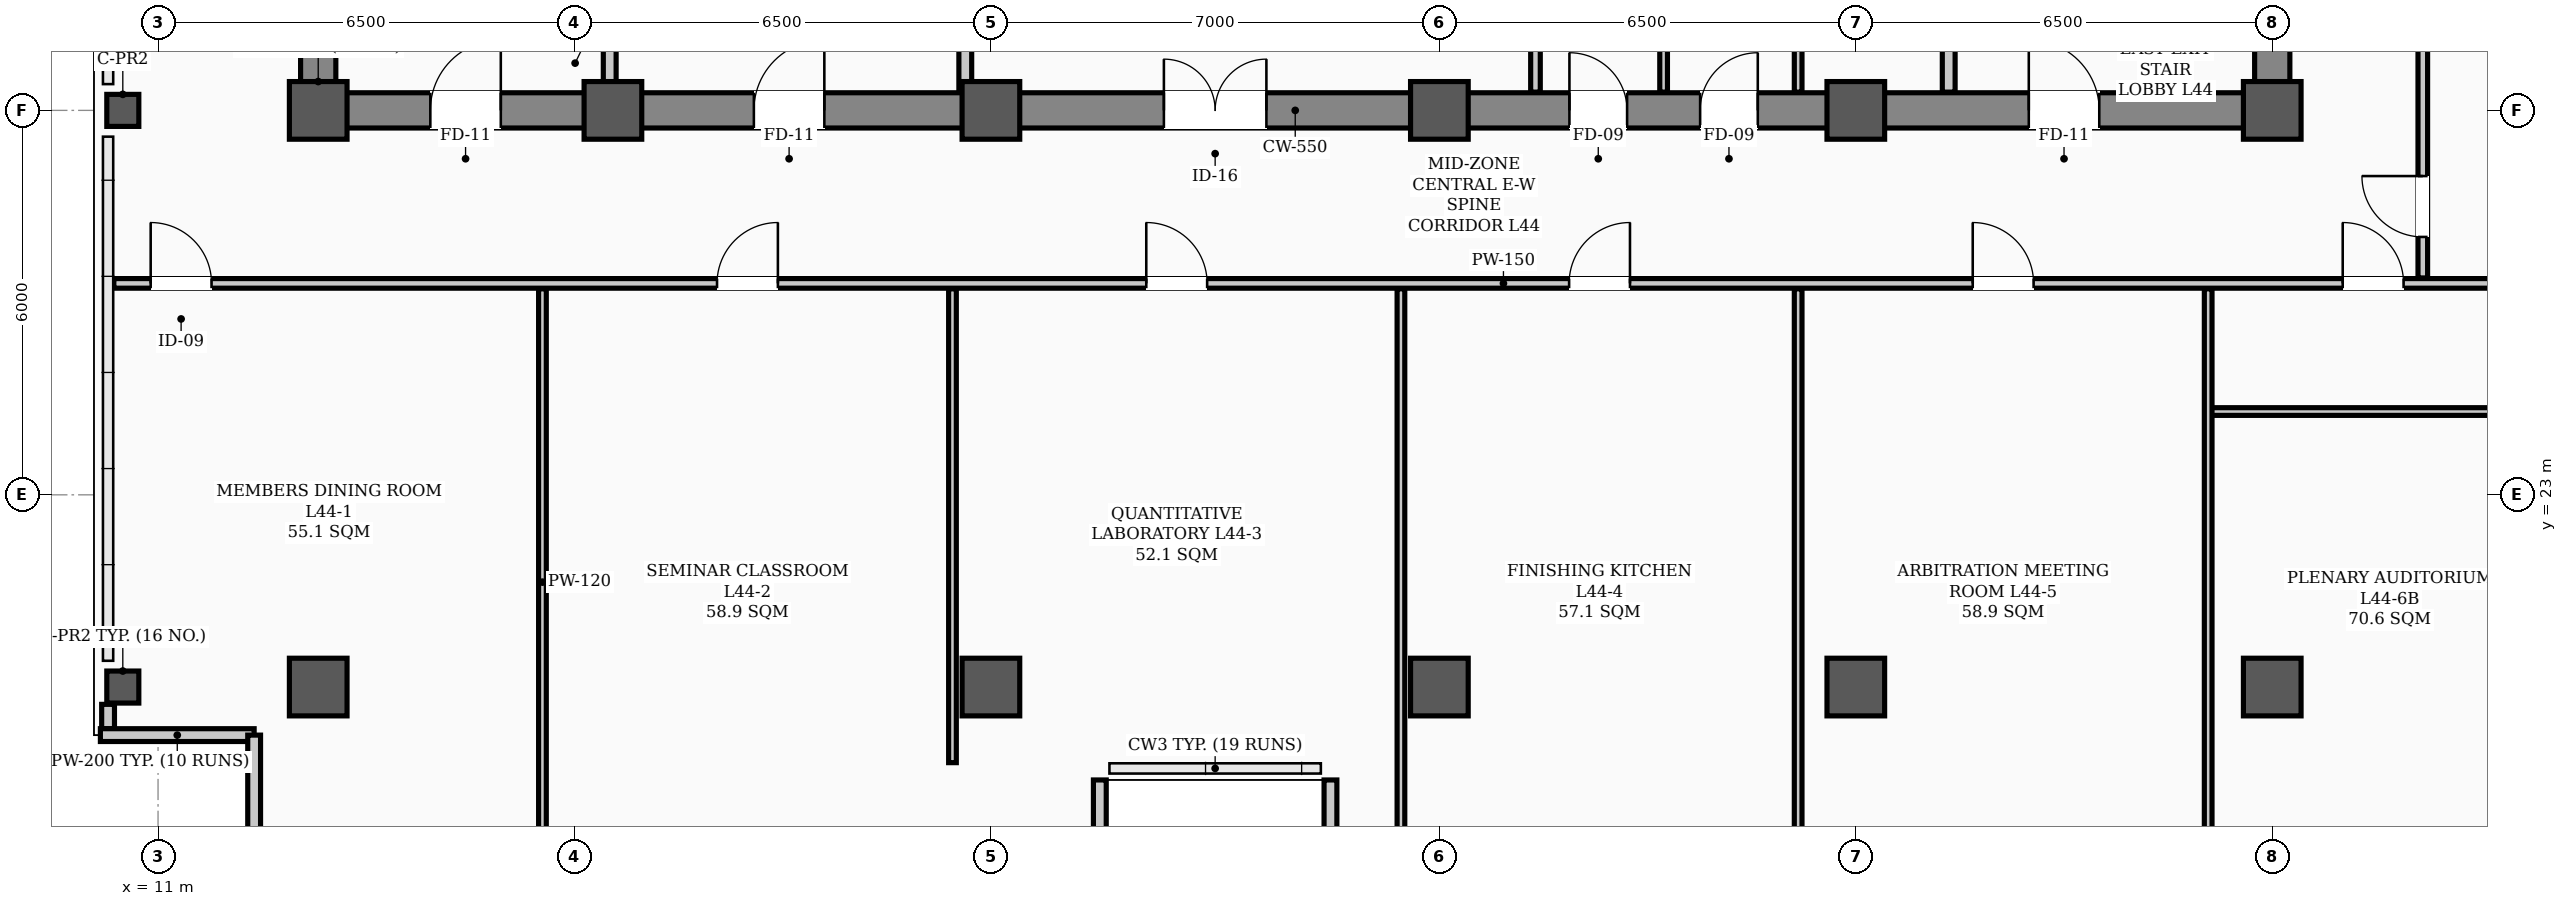
"""IFC4 building model, lengths in metres.
Left out: names, types, materials, properties, quantities, classifications, styles, units other than length and angle.
Written with IfcOpenShell. Run it as: python <this file> out.ifc"""

import sys

from ifc_helpers import new_model, si_unit, direction, frame, frame_2d, origin, origin_2d, place, context, subcontext, project, spatial, rectangle, hollow_rectangle, extrude, element, fill, save


model = new_model("IFC4")
c1 = context("Model", 3, precision=1e-05, world=origin(), true_north=direction((0.0, 1.0)))
c2 = subcontext(c1, "Body", "Model", "MODEL_VIEW")
j1 = project(units=[si_unit("LENGTHUNIT", "METRE"), si_unit("PLANEANGLEUNIT", "RADIAN")], contexts=[c1])
p1 = place(None, origin())
s1 = spatial("IfcSite", under=j1, at=p1, CompositionType="ELEMENT")
p2 = place(p1, origin())
s2 = spatial("IfcBuilding", under=s1, at=p2, CompositionType="ELEMENT")
p3 = place(p2, frame((0.0, 0.0, 177.3)))
s3 = spatial("IfcBuildingStorey", under=s2, at=p3, CompositionType="ELEMENT", Elevation=177.3)
for number, where, z_axis, x_axis in (
    (1, (13.5, 29.0, 0.0), (0.0, 0.0, 1.0), (1.0, 0.0, 0.0)),
    (2, (18.1, 29.0, 0.0), (0.0, 0.0, 1.0), (1.0, 0.0, 0.0)),
    (3, (24.0, 29.0, 0.0), (0.0, 0.0, 1.0), (1.0, 0.0, 0.0)),
    (4, (31.0, 29.0, 0.0), (0.0, 0.0, 1.0), (1.0, 0.0, 0.0)),
    (5, (37.5, 29.0, 0.0), (0.0, 0.0, 1.0), (1.0, 0.0, 0.0)),
    (6, (44.0, 29.0, 0.0), (0.0, 0.0, 1.0), (1.0, 0.0, 0.0)),
    (7, (13.5, 20.0, 0.0), (0.0, 0.0, 1.0), (1.0, 0.0, 0.0)),
    (8, (24.0, 20.0, 0.0), (0.0, 0.0, 1.0), (1.0, 0.0, 0.0)),
    (9, (31.0, 20.0, 0.0), (0.0, 0.0, 1.0), (1.0, 0.0, 0.0)),
    (10, (37.5, 20.0, 0.0), (0.0, 0.0, 1.0), (1.0, 0.0, 0.0)),
    (11, (44.0, 20.0, 0.0), (0.0, 0.0, 1.0), (1.0, 0.0, 0.0)),
):
    element("IfcColumn", number, at=place(p3, frame(where, z_axis=z_axis, x_axis=x_axis)), inside=s3, PredefinedType="COLUMN", context=c2, shape_type="SweptSolid", body=[
        extrude(hollow_rectangle(XDim=0.9, YDim=0.9, WallThickness=0.035, InnerFilletRadius=0.017, OuterFilletRadius=0.052, at=origin_2d()), origin(), (0.0, 0.0, 1.0), 3.9),
    ])
for number, where, z_axis, x_axis in (
    (12, (10.45, 20.0, 0.0), (0.0, 0.0, 1.0), (1.0, 0.0, 0.0)),
    (13, (10.45, 29.0, 0.0), (0.0, 0.0, 1.0), (1.0, 0.0, 0.0)),
):
    element("IfcColumn", number, at=place(p3, frame(where, z_axis=z_axis, x_axis=x_axis)), inside=s3, PredefinedType="COLUMN", context=c2, shape_type="SweptSolid", body=[
        extrude(hollow_rectangle(XDim=0.5, YDim=0.5, WallThickness=0.024, InnerFilletRadius=0.012, OuterFilletRadius=0.036, at=origin_2d()), origin(), (0.0, 0.0, 1.0), 3.9),
    ])
p4 = place(p3, frame((10.22, 19.35, 0.0), z_axis=(0.0, 0.0, 1.0), x_axis=(0.0, 1.0, 0.0)))
e14 = element("IfcWall", 14, at=p4, inside=s3, PredefinedType="PARAPET", context=c2, shape_type="SweptSolid", body=[
    extrude(rectangle(XDim=0.38, YDim=0.2, at=frame_2d((0.19, 0.0))), origin(), (0.0, 0.0, 1.0), 1.2),
])
for number, where, z_axis, x_axis in (
    (15, (10.1, 19.25, 0.0), (0.0, 0.0, 1.0), (1.0, 0.0, 0.0)),
    (16, (12.5, 19.25, 0.0), (0.0, 0.0, 1.0), (0.0, -1.0, 0.0)),
):
    element("IfcWall", number, at=place(p3, frame(where, z_axis=z_axis, x_axis=x_axis)), inside=s3, PredefinedType="PARAPET", context=c2, shape_type="SweptSolid", body=[
        extrude(rectangle(XDim=2.4, YDim=0.2, at=frame_2d((1.2, 0.0))), origin(), (0.0, 0.0, 1.0), 1.2),
    ])
for number, where, z_axis, x_axis in (
    (17, (25.7, 16.85, 0.0), (0.0, 0.0, 1.0), (0.0, 1.0, 0.0)),
    (18, (29.3, 18.55, 0.0), (0.0, 0.0, 1.0), (0.0, -1.0, 0.0)),
):
    element("IfcWall", number, at=place(p3, frame(where, z_axis=z_axis, x_axis=x_axis)), inside=s3, PredefinedType="PARAPET", context=c2, shape_type="SweptSolid", body=[
        extrude(rectangle(XDim=1.7, YDim=0.2, at=frame_2d((0.85, 0.0))), origin(), (0.0, 0.0, 1.0), 1.2),
    ])
p5 = place(p3, frame((13.5, 29.0, 0.0), z_axis=(0.0, 0.0, 1.0), x_axis=(1.0, 0.0, 0.0)))
e19 = element("IfcWall", 19, at=p5, inside=s3, PredefinedType="SHEAR", context=c2, shape_type="SweptSolid", body=[
    extrude(rectangle(XDim=30.5, YDim=0.55, at=frame_2d((15.25, 0.0))), origin(), (0.0, 0.0, 1.0), 3.72),
])
p6 = place(p5, frame((1.75, 0.0, 0.0)))
e20 = element("IfcOpeningElement", 20, at=p6, cuts=e19, PredefinedType="OPENING", context=c2, shape_type="SweptSolid", body=[
    extrude(rectangle(XDim=1.1, YDim=2.08, at=frame_2d((0.55, 1.04))), frame((0.0, 0.285, 0.0), z_axis=(0.0, -1.0, 0.0), x_axis=(1.0, 0.0, 0.0)), (0.0, 0.0, 1.0), 0.57),
])
p7 = place(p5, frame((26.7, 0.0, 0.0)))
e21 = element("IfcOpeningElement", 21, at=p7, cuts=e19, PredefinedType="OPENING", context=c2, shape_type="SweptSolid", body=[
    extrude(rectangle(XDim=1.1, YDim=2.08, at=frame_2d((0.55, 1.04))), frame((0.0, 0.285, 0.0), z_axis=(0.0, -1.0, 0.0), x_axis=(1.0, 0.0, 0.0)), (0.0, 0.0, 1.0), 0.57),
])
p8 = place(p5, frame((6.8, 0.0, 0.0)))
e22 = element("IfcOpeningElement", 22, at=p8, cuts=e19, PredefinedType="OPENING", context=c2, shape_type="SweptSolid", body=[
    extrude(rectangle(XDim=1.1, YDim=2.08, at=frame_2d((0.55, 1.04))), frame((0.0, 0.285, 0.0), z_axis=(0.0, -1.0, 0.0), x_axis=(1.0, 0.0, 0.0)), (0.0, 0.0, 1.0), 0.57),
])
p9 = place(p5, frame((13.2, 0.0, 0.0)))
e23 = element("IfcOpeningElement", 23, at=p9, cuts=e19, PredefinedType="OPENING", context=c2, shape_type="SweptSolid", body=[
    extrude(rectangle(XDim=1.6, YDim=2.08, at=frame_2d((0.8, 1.04))), frame((0.0, 0.285, 0.0), z_axis=(0.0, -1.0, 0.0), x_axis=(1.0, 0.0, 0.0)), (0.0, 0.0, 1.0), 0.57),
])
p10 = place(p5, frame((19.53, 0.0, 0.0)))
e24 = element("IfcOpeningElement", 24, at=p10, cuts=e19, PredefinedType="OPENING", context=c2, shape_type="SweptSolid", body=[
    extrude(rectangle(XDim=0.9, YDim=2.08, at=frame_2d((0.45, 1.04))), frame((0.0, 0.285, 0.0), z_axis=(0.0, -1.0, 0.0), x_axis=(1.0, 0.0, 0.0)), (0.0, 0.0, 1.0), 0.57),
])
p11 = place(p5, frame((21.57, 0.0, 0.0)))
e25 = element("IfcOpeningElement", 25, at=p11, cuts=e19, PredefinedType="OPENING", context=c2, shape_type="SweptSolid", body=[
    extrude(rectangle(XDim=0.9, YDim=2.08, at=frame_2d((0.45, 1.04))), frame((0.0, 0.285, 0.0), z_axis=(0.0, -1.0, 0.0), x_axis=(1.0, 0.0, 0.0)), (0.0, 0.0, 1.0), 0.57),
])
for number, where, z_axis, x_axis in (
    (26, (13.5, 29.35, 0.0), (0.0, 0.0, 1.0), (0.0, 1.0, 0.0)),
    (27, (44.0, 29.35, 0.0), (0.0, 0.0, 1.0), (0.0, 1.0, 0.0)),
):
    element("IfcWall", number, at=place(p3, frame(where, z_axis=z_axis, x_axis=x_axis)), inside=s3, PredefinedType="SHEAR", context=c2, shape_type="SweptSolid", body=[
        extrude(rectangle(XDim=8.6, YDim=0.55, at=frame_2d((4.3, 0.0))), origin(), (0.0, 0.0, 1.0), 3.72),
    ])
p12 = place(p3, frame((10.31, 26.3, 0.0), z_axis=(0.0, 0.0, 1.0), x_axis=(1.0, 0.0, 0.0)))
e28 = element("IfcWall", 28, at=p12, inside=s3, PredefinedType="PARTITIONING", context=c2, shape_type="SweptSolid", body=[
    extrude(rectangle(XDim=43.38, YDim=0.15, at=frame_2d((21.69, 0.0))), origin(), (0.0, 0.0, 1.0), 3.2),
])
p13 = place(p12, frame((0.575, 0.0, 0.0)))
e29 = element("IfcOpeningElement", 29, at=p13, cuts=e28, PredefinedType="OPENING", context=c2, shape_type="SweptSolid", body=[
    extrude(rectangle(XDim=0.95, YDim=2.08, at=frame_2d((0.475, 1.04))), frame((0.0, 0.085, 0.0), z_axis=(0.0, -1.0, 0.0), x_axis=(1.0, 0.0, 0.0)), (0.0, 0.0, 1.0), 0.17),
])
p14 = place(p12, frame((9.415, 0.0, 0.0)))
e30 = element("IfcOpeningElement", 30, at=p14, cuts=e28, PredefinedType="OPENING", context=c2, shape_type="SweptSolid", body=[
    extrude(rectangle(XDim=0.95, YDim=2.08, at=frame_2d((0.475, 1.04))), frame((0.0, 0.085, 0.0), z_axis=(0.0, -1.0, 0.0), x_axis=(1.0, 0.0, 0.0)), (0.0, 0.0, 1.0), 0.17),
])
p15 = place(p12, frame((16.115, 0.0, 0.0)))
e31 = element("IfcOpeningElement", 31, at=p15, cuts=e28, PredefinedType="OPENING", context=c2, shape_type="SweptSolid", body=[
    extrude(rectangle(XDim=0.95, YDim=2.08, at=frame_2d((0.475, 1.04))), frame((0.0, 0.085, 0.0), z_axis=(0.0, -1.0, 0.0), x_axis=(1.0, 0.0, 0.0)), (0.0, 0.0, 1.0), 0.17),
])
p16 = place(p12, frame((22.715, 0.0, 0.0)))
e32 = element("IfcOpeningElement", 32, at=p16, cuts=e28, PredefinedType="OPENING", context=c2, shape_type="SweptSolid", body=[
    extrude(rectangle(XDim=0.95, YDim=2.08, at=frame_2d((0.475, 1.04))), frame((0.0, 0.085, 0.0), z_axis=(0.0, -1.0, 0.0), x_axis=(1.0, 0.0, 0.0)), (0.0, 0.0, 1.0), 0.17),
])
p17 = place(p12, frame((29.015, 0.0, 0.0)))
e33 = element("IfcOpeningElement", 33, at=p17, cuts=e28, PredefinedType="OPENING", context=c2, shape_type="SweptSolid", body=[
    extrude(rectangle(XDim=0.95, YDim=2.08, at=frame_2d((0.475, 1.04))), frame((0.0, 0.085, 0.0), z_axis=(0.0, -1.0, 0.0), x_axis=(1.0, 0.0, 0.0)), (0.0, 0.0, 1.0), 0.17),
])
p18 = place(p12, frame((34.79, 0.0, 0.0)))
e34 = element("IfcOpeningElement", 34, at=p18, cuts=e28, PredefinedType="OPENING", context=c2, shape_type="SweptSolid", body=[
    extrude(rectangle(XDim=0.95, YDim=2.08, at=frame_2d((0.475, 1.04))), frame((0.0, 0.085, 0.0), z_axis=(0.0, -1.0, 0.0), x_axis=(1.0, 0.0, 0.0)), (0.0, 0.0, 1.0), 0.17),
])
p19 = place(p3, frame((43.0, 24.3, 0.0), z_axis=(0.0, 0.0, 1.0), x_axis=(1.0, 0.0, 0.0)))
e35 = element("IfcWall", 35, at=p19, inside=s3, PredefinedType="PARTITIONING", context=c2, shape_type="SweptSolid", body=[
    extrude(rectangle(XDim=10.69, YDim=0.12, at=frame_2d((5.345, 0.0))), origin(), (0.0, 0.0, 1.0), 3.2),
])
p20 = place(p19, frame((4.87, 0.0, 0.0)))
e36 = element("IfcOpeningElement", 36, at=p20, cuts=e35, PredefinedType="OPENING", context=c2, shape_type="SweptSolid", body=[
    extrude(rectangle(XDim=0.95, YDim=2.08, at=frame_2d((0.475, 1.04))), frame((0.0, 0.07, 0.0), z_axis=(0.0, -1.0, 0.0), x_axis=(1.0, 0.0, 0.0)), (0.0, 0.0, 1.0), 0.14),
])
for number, where, z_axis, x_axis in (
    (37, (18.05, 29.285, 0.0), (0.0, 0.0, 1.0), (0.0, 1.0, 0.0)),
    (38, (38.95, 29.285, 0.0), (0.0, 0.0, 1.0), (0.0, 1.0, 0.0)),
):
    element("IfcWall", number, at=place(p3, frame(where, z_axis=z_axis, x_axis=x_axis)), inside=s3, PredefinedType="STANDARD", context=c2, shape_type="SweptSolid", body=[
        extrude(rectangle(XDim=1.015, YDim=0.2, at=frame_2d((0.508, 0.0))), origin(), (0.0, 0.0, 1.0), 3.35),
    ])
p21 = place(p3, frame((23.6, 29.285, 0.0), z_axis=(0.0, 0.0, 1.0), x_axis=(0.0, 1.0, 0.0)))
e39 = element("IfcWall", 39, at=p21, inside=s3, PredefinedType="STANDARD", context=c2, shape_type="SweptSolid", body=[
    extrude(rectangle(XDim=5.415, YDim=0.2, at=frame_2d((2.708, 0.0))), origin(), (0.0, 0.0, 1.0), 3.2),
])
p22 = place(p3, frame((32.5, 29.285, 0.0), z_axis=(0.0, 0.0, 1.0), x_axis=(0.0, 1.0, 0.0)))
e40 = element("IfcWall", 40, at=p22, inside=s3, PredefinedType="PARTITIONING", context=c2, shape_type="SweptSolid", body=[
    extrude(rectangle(XDim=2.48, YDim=0.15, at=frame_2d((1.24, 0.0))), origin(), (0.0, 0.0, 1.0), 3.35),
])
for number, where, z_axis, x_axis in (
    (41, (36.6, 29.285, 0.0), (0.0, 0.0, 1.0), (0.0, 1.0, 0.0)),
    (42, (34.5, 29.285, 0.0), (0.0, 0.0, 1.0), (0.0, 1.0, 0.0)),
):
    element("IfcWall", number, at=place(p3, frame(where, z_axis=z_axis, x_axis=x_axis)), inside=s3, PredefinedType="PARTITIONING", context=c2, shape_type="SweptSolid", body=[
        extrude(rectangle(XDim=2.48, YDim=0.12, at=frame_2d((1.24, 0.0))), origin(), (0.0, 0.0, 1.0), 3.35),
    ])
p23 = place(p3, frame((46.35, 26.385, 0.0), z_axis=(0.0, 0.0, 1.0), x_axis=(0.0, 1.0, 0.0)))
e43 = element("IfcWall", 43, at=p23, inside=s3, PredefinedType="PARTITIONING", context=c2, shape_type="SweptSolid", body=[
    extrude(rectangle(XDim=13.58, YDim=0.15, at=frame_2d((6.79, 0.0))), origin(), (0.0, 0.0, 1.0), 3.1),
])
p24 = place(p23, frame((0.64, 0.0, 0.0)))
e44 = element("IfcOpeningElement", 44, at=p24, cuts=e43, PredefinedType="OPENING", context=c2, shape_type="SweptSolid", body=[
    extrude(rectangle(XDim=0.95, YDim=2.08, at=frame_2d((0.475, 1.04))), frame((0.0, 0.085, 0.0), z_axis=(0.0, -1.0, 0.0), x_axis=(1.0, 0.0, 0.0)), (0.0, 0.0, 1.0), 0.17),
])
p25 = place(p23, frame((10.065, 0.0, 0.0)))
e45 = element("IfcOpeningElement", 45, at=p25, cuts=e43, PredefinedType="OPENING", context=c2, shape_type="SweptSolid", body=[
    extrude(rectangle(XDim=0.95, YDim=2.08, at=frame_2d((0.475, 1.04))), frame((0.0, 0.085, 0.0), z_axis=(0.0, -1.0, 0.0), x_axis=(1.0, 0.0, 0.0)), (0.0, 0.0, 1.0), 0.17),
])
p26 = place(p3, frame((17.0, 17.06, 0.0), z_axis=(0.0, 0.0, 1.0), x_axis=(0.0, 1.0, 0.0)))
e46 = element("IfcWall", 46, at=p26, inside=s3, PredefinedType="PARTITIONING", context=c2, shape_type="SweptSolid", body=[
    extrude(rectangle(XDim=9.155, YDim=0.12, at=frame_2d((4.578, 0.0))), origin(), (0.0, 0.0, 1.0), 3.1),
])
p27 = place(p3, frame((23.4, 18.82, 0.0), z_axis=(0.0, 0.0, 1.0), x_axis=(0.0, 1.0, 0.0)))
e47 = element("IfcWall", 47, at=p27, inside=s3, PredefinedType="PARTITIONING", context=c2, shape_type="SweptSolid", body=[
    extrude(rectangle(XDim=7.395, YDim=0.12, at=frame_2d((3.698, 0.0))), origin(), (0.0, 0.0, 1.0), 3.1),
])
for number, where, z_axis, x_axis in (
    (48, (30.4, 17.06, 0.0), (0.0, 0.0, 1.0), (0.0, 1.0, 0.0)),
    (49, (36.6, 17.06, 0.0), (0.0, 0.0, 1.0), (0.0, 1.0, 0.0)),
    (50, (43.0, 17.06, 0.0), (0.0, 0.0, 1.0), (0.0, 1.0, 0.0)),
):
    element("IfcWall", number, at=place(p3, frame(where, z_axis=z_axis, x_axis=x_axis)), inside=s3, PredefinedType="PARTITIONING", context=c2, shape_type="SweptSolid", body=[
        extrude(rectangle(XDim=9.155, YDim=0.12, at=frame_2d((4.578, 0.0))), origin(), (0.0, 0.0, 1.0), 3.1),
    ])
p28 = place(p6, origin())
e51 = element("IfcDoor", 51, at=p28, inside=s3, OperationType="SINGLE_SWING_RIGHT", PredefinedType="DOOR", context=c2, shape_type="SweptSolid", body=[
    extrude(rectangle(XDim=1.1, YDim=2.08, at=frame_2d((0.55, 1.04))), frame((0.0, 0.025, 0.0), z_axis=(0.0, -1.0, 0.0), x_axis=(1.0, 0.0, 0.0)), (0.0, 0.0, 1.0), 0.05),
])
fill(e20, e51)
p29 = place(p7, origin())
e52 = element("IfcDoor", 52, at=p29, inside=s3, OperationType="SINGLE_SWING_LEFT", PredefinedType="DOOR", context=c2, shape_type="SweptSolid", body=[
    extrude(rectangle(XDim=1.1, YDim=2.08, at=frame_2d((0.55, 1.04))), frame((0.0, 0.025, 0.0), z_axis=(0.0, -1.0, 0.0), x_axis=(1.0, 0.0, 0.0)), (0.0, 0.0, 1.0), 0.05),
])
fill(e21, e52)
p30 = place(p8, origin())
e53 = element("IfcDoor", 53, at=p30, inside=s3, OperationType="SINGLE_SWING_RIGHT", PredefinedType="DOOR", context=c2, shape_type="SweptSolid", body=[
    extrude(rectangle(XDim=1.1, YDim=2.08, at=frame_2d((0.55, 1.04))), frame((0.0, 0.025, 0.0), z_axis=(0.0, -1.0, 0.0), x_axis=(1.0, 0.0, 0.0)), (0.0, 0.0, 1.0), 0.05),
])
fill(e22, e53)
p31 = place(p9, origin())
e54 = element("IfcDoor", 54, at=p31, inside=s3, OperationType="DOUBLE_DOOR_SINGLE_SWING", PredefinedType="DOOR", context=c2, shape_type="SweptSolid", body=[
    extrude(rectangle(XDim=1.6, YDim=2.08, at=frame_2d((0.8, 1.04))), frame((0.0, 0.025, 0.0), z_axis=(0.0, -1.0, 0.0), x_axis=(1.0, 0.0, 0.0)), (0.0, 0.0, 1.0), 0.05),
])
fill(e23, e54)
p32 = place(p10, origin())
e55 = element("IfcDoor", 55, at=p32, inside=s3, OperationType="SINGLE_SWING_LEFT", PredefinedType="DOOR", context=c2, shape_type="SweptSolid", body=[
    extrude(rectangle(XDim=0.9, YDim=2.08, at=frame_2d((0.45, 1.04))), frame((0.0, 0.025, 0.0), z_axis=(0.0, -1.0, 0.0), x_axis=(1.0, 0.0, 0.0)), (0.0, 0.0, 1.0), 0.05),
])
fill(e24, e55)
p33 = place(p11, origin())
e56 = element("IfcDoor", 56, at=p33, inside=s3, OperationType="SINGLE_SWING_RIGHT", PredefinedType="DOOR", context=c2, shape_type="SweptSolid", body=[
    extrude(rectangle(XDim=0.9, YDim=2.08, at=frame_2d((0.45, 1.04))), frame((0.0, 0.025, 0.0), z_axis=(0.0, -1.0, 0.0), x_axis=(1.0, 0.0, 0.0)), (0.0, 0.0, 1.0), 0.05),
])
fill(e25, e56)
p34 = place(p13, origin())
e57 = element("IfcDoor", 57, at=p34, inside=s3, OperationType="SINGLE_SWING_LEFT", PredefinedType="DOOR", context=c2, shape_type="SweptSolid", body=[
    extrude(rectangle(XDim=0.95, YDim=2.08, at=frame_2d((0.475, 1.04))), frame((0.0, 0.025, 0.0), z_axis=(0.0, -1.0, 0.0), x_axis=(1.0, 0.0, 0.0)), (0.0, 0.0, 1.0), 0.05),
])
fill(e29, e57)
p35 = place(p14, origin())
e58 = element("IfcDoor", 58, at=p35, inside=s3, OperationType="SINGLE_SWING_RIGHT", PredefinedType="DOOR", context=c2, shape_type="SweptSolid", body=[
    extrude(rectangle(XDim=0.95, YDim=2.08, at=frame_2d((0.475, 1.04))), frame((0.0, 0.025, 0.0), z_axis=(0.0, -1.0, 0.0), x_axis=(1.0, 0.0, 0.0)), (0.0, 0.0, 1.0), 0.05),
])
fill(e30, e58)
p36 = place(p15, origin())
e59 = element("IfcDoor", 59, at=p36, inside=s3, OperationType="SINGLE_SWING_LEFT", PredefinedType="DOOR", context=c2, shape_type="SweptSolid", body=[
    extrude(rectangle(XDim=0.95, YDim=2.08, at=frame_2d((0.475, 1.04))), frame((0.0, 0.025, 0.0), z_axis=(0.0, -1.0, 0.0), x_axis=(1.0, 0.0, 0.0)), (0.0, 0.0, 1.0), 0.05),
])
fill(e31, e59)
p37 = place(p16, origin())
e60 = element("IfcDoor", 60, at=p37, inside=s3, OperationType="SINGLE_SWING_RIGHT", PredefinedType="DOOR", context=c2, shape_type="SweptSolid", body=[
    extrude(rectangle(XDim=0.95, YDim=2.08, at=frame_2d((0.475, 1.04))), frame((0.0, 0.025, 0.0), z_axis=(0.0, -1.0, 0.0), x_axis=(1.0, 0.0, 0.0)), (0.0, 0.0, 1.0), 0.05),
])
fill(e32, e60)
p38 = place(p17, origin())
e61 = element("IfcDoor", 61, at=p38, inside=s3, OperationType="SINGLE_SWING_LEFT", PredefinedType="DOOR", context=c2, shape_type="SweptSolid", body=[
    extrude(rectangle(XDim=0.95, YDim=2.08, at=frame_2d((0.475, 1.04))), frame((0.0, 0.025, 0.0), z_axis=(0.0, -1.0, 0.0), x_axis=(1.0, 0.0, 0.0)), (0.0, 0.0, 1.0), 0.05),
])
fill(e33, e61)
p39 = place(p18, origin())
e62 = element("IfcDoor", 62, at=p39, inside=s3, OperationType="SINGLE_SWING_LEFT", PredefinedType="DOOR", context=c2, shape_type="SweptSolid", body=[
    extrude(rectangle(XDim=0.95, YDim=2.08, at=frame_2d((0.475, 1.04))), frame((0.0, 0.025, 0.0), z_axis=(0.0, -1.0, 0.0), x_axis=(1.0, 0.0, 0.0)), (0.0, 0.0, 1.0), 0.05),
])
fill(e34, e62)
p40 = place(p24, origin())
e63 = element("IfcDoor", 63, at=p40, inside=s3, OperationType="SINGLE_SWING_RIGHT", PredefinedType="DOOR", context=c2, shape_type="SweptSolid", body=[
    extrude(rectangle(XDim=0.95, YDim=2.08, at=frame_2d((0.475, 1.04))), frame((0.0, 0.025, 0.0), z_axis=(0.0, -1.0, 0.0), x_axis=(1.0, 0.0, 0.0)), (0.0, 0.0, 1.0), 0.05),
])
fill(e44, e63)
save(model, sys.argv[1])
